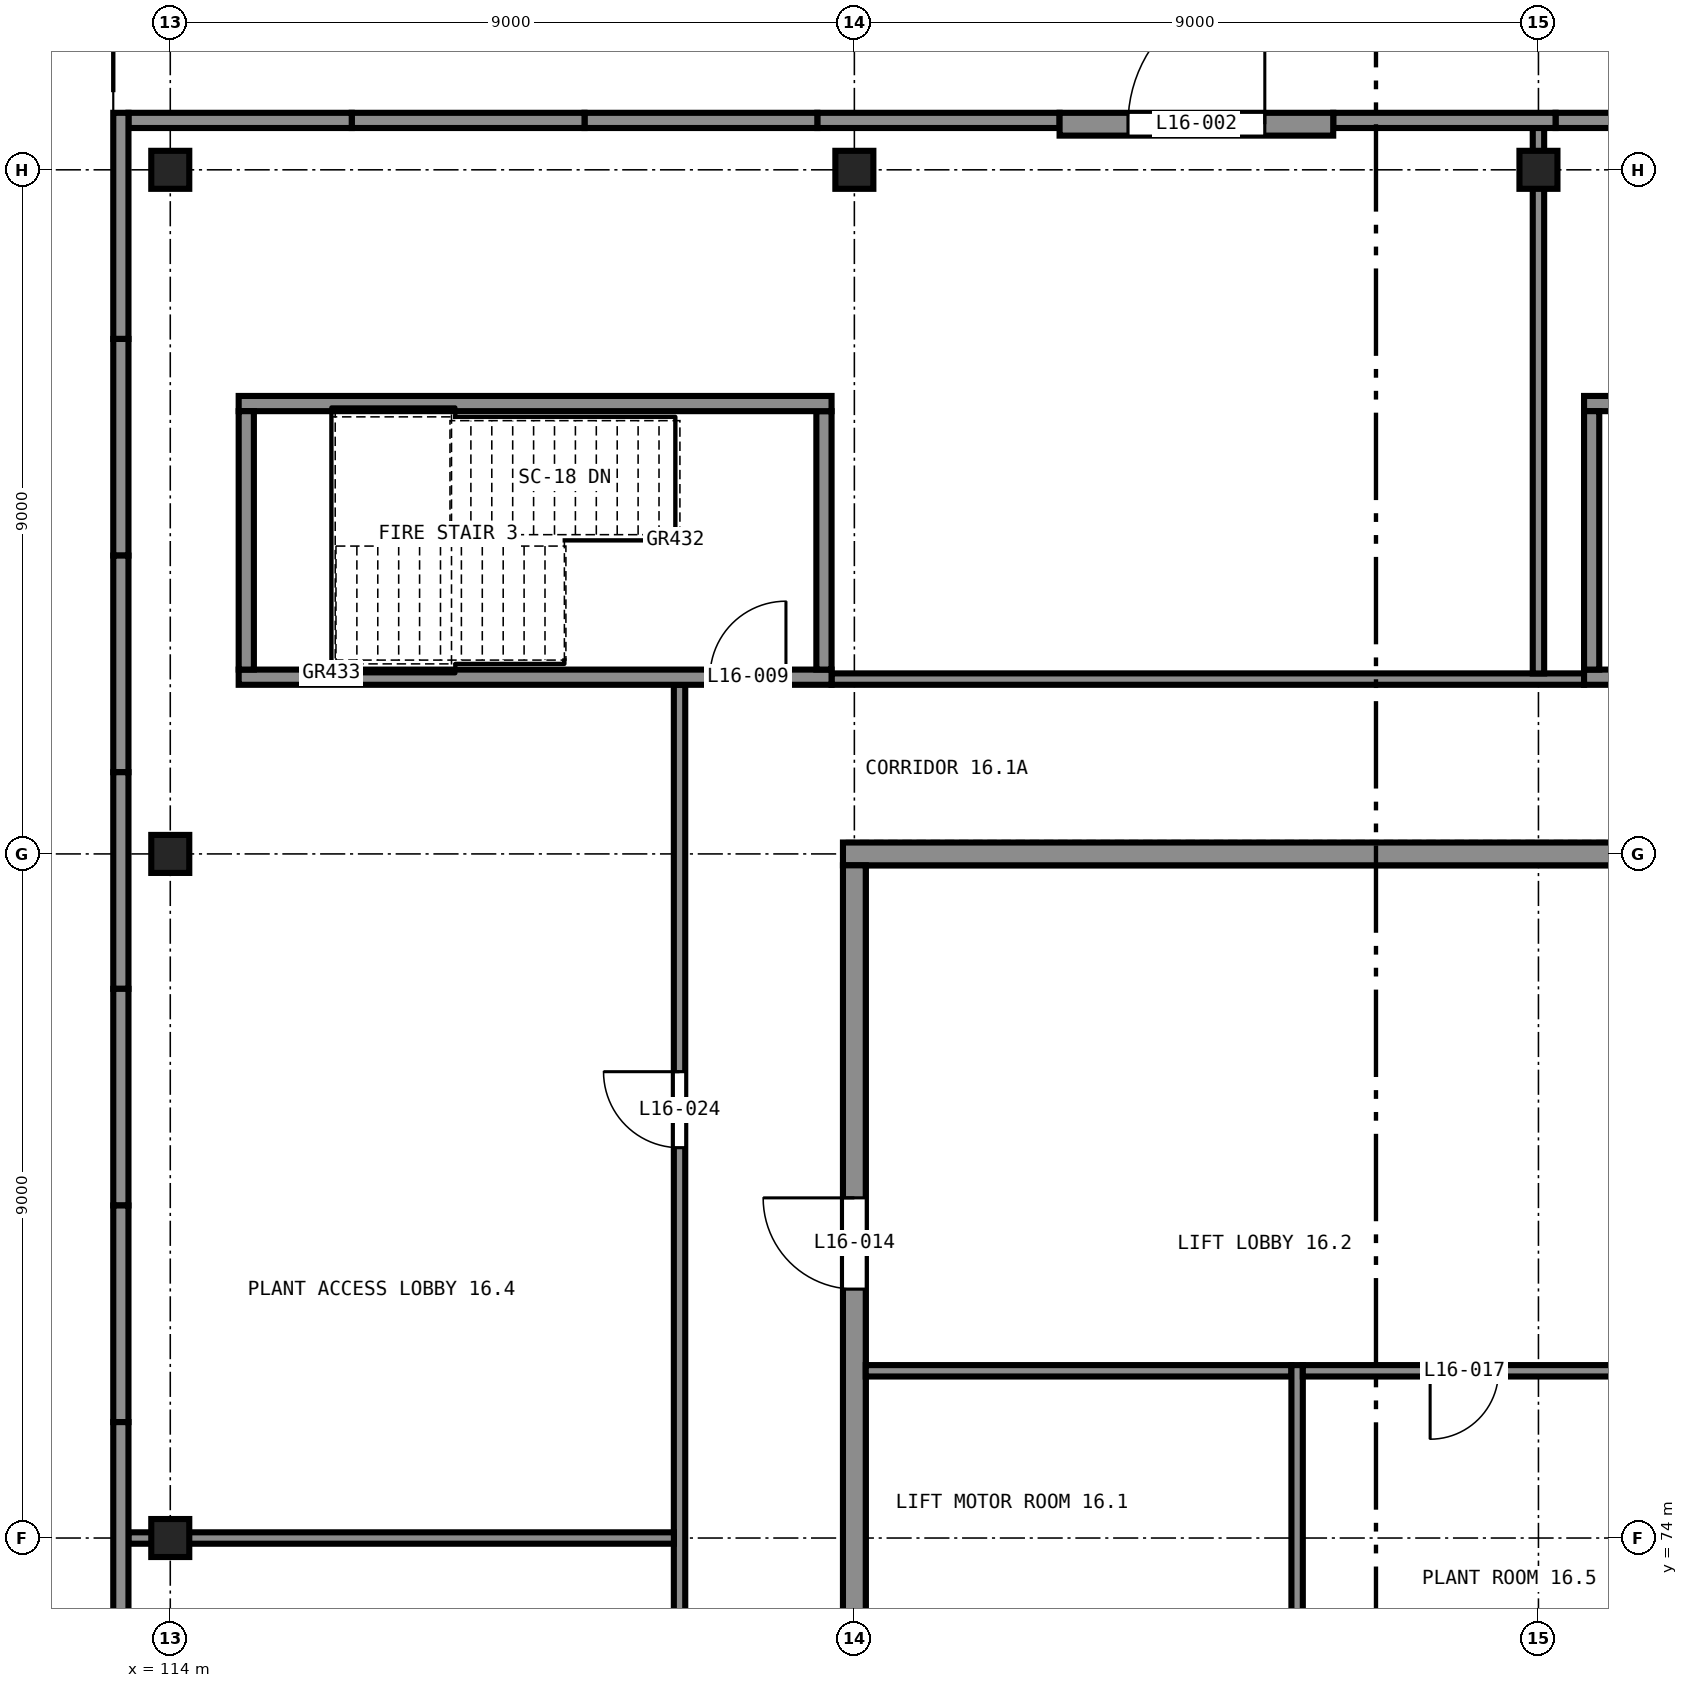
"""IFC4 building model, lengths in metres.
Left out: names, types, materials, properties, quantities, classifications, styles, units other than length and angle.
Written with IfcOpenShell. Run it as: python <this file> out.ifc"""

import sys

from ifc_helpers import new_model, si_unit, direction, frame, frame_2d, origin, origin_2d, place, context, subcontext, project, spatial, polyline, rectangle, outline, extrude, element, fill, save


model = new_model("IFC4")
c1 = context("Model", 3, precision=1e-05, world=origin(), true_north=direction((0.0, 1.0)))
c2 = subcontext(c1, "Body", "Model", "MODEL_VIEW")
j1 = project(units=[si_unit("LENGTHUNIT", "METRE"), si_unit("PLANEANGLEUNIT", "RADIAN")], contexts=[c1])
p1 = place(None, origin())
s1 = spatial("IfcSite", under=j1, at=p1, CompositionType="ELEMENT")
p2 = place(p1, origin())
s2 = spatial("IfcBuilding", under=s1, at=p2, CompositionType="ELEMENT")
p3 = place(p2, frame((0.0, 0.0, 65.5)))
s3 = spatial("IfcBuildingStorey", under=s2, at=p3, CompositionType="ELEMENT", Elevation=65.5)
for number, where, z_axis, x_axis in (
    (1, (114.0, 74.0, 0.0), (0.0, 0.0, 1.0), (1.0, 0.0, 0.0)),
    (2, (114.0, 83.0, 0.0), (0.0, 0.0, 1.0), (1.0, 0.0, 0.0)),
    (3, (114.0, 92.0, 0.0), (0.0, 0.0, 1.0), (1.0, 0.0, 0.0)),
    (4, (123.0, 92.0, 0.0), (0.0, 0.0, 1.0), (1.0, 0.0, 0.0)),
    (5, (132.0, 92.0, 0.0), (0.0, 0.0, 1.0), (1.0, 0.0, 0.0)),
):
    element("IfcColumn", number, at=place(p3, frame(where, z_axis=z_axis, x_axis=x_axis)), inside=s3, PredefinedType="COLUMN", context=c2, shape_type="SweptSolid", body=[
        extrude(rectangle(XDim=0.5, YDim=0.5, at=origin_2d()), origin(), (0.0, 0.0, 1.0), 4.7),
    ])
p4 = place(p3, frame((141.15, 83.0, 0.0), z_axis=(0.0, 0.0, 1.0), x_axis=(-1.0, 0.0, 0.0)))
e6 = element("IfcWall", 6, at=p4, inside=s3, PredefinedType="SHEAR", context=c2, shape_type="SweptSolid", body=[
    extrude(rectangle(XDim=18.3, YDim=0.3, at=frame_2d((9.15, 0.0))), origin(), (0.0, 0.0, 1.0), 4.7),
])
p5 = place(p3, frame((123.0, 82.85, 0.0), z_axis=(0.0, 0.0, 1.0), x_axis=(0.0, -1.0, 0.0)))
e7 = element("IfcWall", 7, at=p5, inside=s3, PredefinedType="SHEAR", context=c2, shape_type="SweptSolid", body=[
    extrude(rectangle(XDim=17.7, YDim=0.3, at=frame_2d((8.85, 0.0))), origin(), (0.0, 0.0, 1.0), 4.7),
])
p6 = place(p5, frame((12.125, 0.0, 0.0)))
e8 = element("IfcOpeningElement", 8, at=p6, cuts=e7, PredefinedType="OPENING", context=c2, shape_type="SweptSolid", body=[
    extrude(rectangle(XDim=1.2, YDim=2.1, at=frame_2d((0.6, 1.05))), frame((0.0, 0.16, 0.0), z_axis=(0.0, -1.0, 0.0), x_axis=(1.0, 0.0, 0.0)), (0.0, 0.0, 1.0), 0.32),
])
p7 = place(p5, frame((4.375, 0.0, 0.0)))
e9 = element("IfcOpeningElement", 9, at=p7, cuts=e7, PredefinedType="OPENING", context=c2, shape_type="SweptSolid", body=[
    extrude(rectangle(XDim=1.2, YDim=2.1, at=frame_2d((0.6, 1.05))), frame((0.0, 0.16, 0.0), z_axis=(0.0, -1.0, 0.0), x_axis=(1.0, 0.0, 0.0)), (0.0, 0.0, 1.0), 0.32),
])
p8 = place(p3, frame((135.275, 92.65, 0.0), z_axis=(0.0, 0.0, 1.0), x_axis=(-1.0, 0.0, 0.0)))
e10 = element("IfcWall", 10, at=p8, inside=s3, PredefinedType="SOLIDWALL", context=c2, shape_type="SweptSolid", body=[
    extrude(rectangle(XDim=3.05, YDim=0.2, at=frame_2d((1.525, 0.0))), origin(), (0.0, 0.0, 1.0), 4.7),
])
p9 = place(p3, frame((132.225, 92.65, 0.0), z_axis=(0.0, 0.0, 1.0), x_axis=(-1.0, 0.0, 0.0)))
e11 = element("IfcWall", 11, at=p9, inside=s3, PredefinedType="SOLIDWALL", context=c2, shape_type="SweptSolid", body=[
    extrude(rectangle(XDim=2.925, YDim=0.2, at=frame_2d((1.462, 0.0))), origin(), (0.0, 0.0, 1.0), 4.7),
])
p10 = place(p3, frame((129.3, 92.6, 0.0), z_axis=(0.0, 0.0, 1.0), x_axis=(-1.0, 0.0, 0.0)))
e12 = element("IfcWall", 12, at=p10, inside=s3, PredefinedType="SOLIDWALL", context=c2, shape_type="SweptSolid", body=[
    extrude(rectangle(XDim=3.6, YDim=0.3, at=frame_2d((1.8, 0.0))), origin(), (0.0, 0.0, 1.0), 4.7),
])
p11 = place(p10, frame((0.9, 0.0, 0.0)))
e13 = element("IfcOpeningElement", 13, at=p11, cuts=e12, PredefinedType="OPENING", context=c2, shape_type="SweptSolid", body=[
    extrude(rectangle(XDim=1.8, YDim=2.4, at=frame_2d((0.9, 1.2))), frame((0.0, 0.16, 0.0), z_axis=(0.0, -1.0, 0.0), x_axis=(1.0, 0.0, 0.0)), (0.0, 0.0, 1.0), 0.32),
])
p12 = place(p3, frame((125.7, 92.65, 0.0), z_axis=(0.0, 0.0, 1.0), x_axis=(-1.0, 0.0, 0.0)))
e14 = element("IfcWall", 14, at=p12, inside=s3, PredefinedType="SOLIDWALL", context=c2, shape_type="SweptSolid", body=[
    extrude(rectangle(XDim=3.188, YDim=0.2, at=frame_2d((1.594, 0.0))), origin(), (0.0, 0.0, 1.0), 4.7),
])
for number, where, z_axis, x_axis in (
    (15, (122.512, 92.65, 0.0), (0.0, 0.0, 1.0), (-1.0, 0.0, 0.0)),
    (16, (119.45, 92.65, 0.0), (0.0, 0.0, 1.0), (-1.0, 0.0, 0.0)),
):
    element("IfcWall", number, at=place(p3, frame(where, z_axis=z_axis, x_axis=x_axis)), inside=s3, PredefinedType="SOLIDWALL", context=c2, shape_type="SweptSolid", body=[
        extrude(rectangle(XDim=3.062, YDim=0.2, at=frame_2d((1.531, 0.0))), origin(), (0.0, 0.0, 1.0), 4.7),
    ])
p13 = place(p3, frame((116.387, 92.65, 0.0), z_axis=(0.0, 0.0, 1.0), x_axis=(-1.0, 0.0, 0.0)))
e17 = element("IfcWall", 17, at=p13, inside=s3, PredefinedType="SOLIDWALL", context=c2, shape_type="SweptSolid", body=[
    extrude(rectangle(XDim=2.938, YDim=0.2, at=frame_2d((1.469, 0.0))), origin(), (0.0, 0.0, 1.0), 4.7),
])
p14 = place(p3, frame((113.35, 92.75, 0.0), z_axis=(0.0, 0.0, 1.0), x_axis=(0.0, -1.0, 0.0)))
e18 = element("IfcWall", 18, at=p14, inside=s3, PredefinedType="SOLIDWALL", context=c2, shape_type="SweptSolid", body=[
    extrude(rectangle(XDim=2.975, YDim=0.2, at=frame_2d((1.488, 0.0))), origin(), (0.0, 0.0, 1.0), 4.7),
])
p15 = place(p3, frame((113.35, 89.775, 0.0), z_axis=(0.0, 0.0, 1.0), x_axis=(0.0, -1.0, 0.0)))
e19 = element("IfcWall", 19, at=p15, inside=s3, PredefinedType="SOLIDWALL", context=c2, shape_type="SweptSolid", body=[
    extrude(rectangle(XDim=2.85, YDim=0.2, at=frame_2d((1.425, 0.0))), origin(), (0.0, 0.0, 1.0), 4.7),
])
p16 = place(p3, frame((113.35, 86.925, 0.0), z_axis=(0.0, 0.0, 1.0), x_axis=(0.0, -1.0, 0.0)))
e20 = element("IfcWall", 20, at=p16, inside=s3, PredefinedType="SOLIDWALL", context=c2, shape_type="SweptSolid", body=[
    extrude(rectangle(XDim=2.85, YDim=0.2, at=frame_2d((1.425, 0.0))), origin(), (0.0, 0.0, 1.0), 4.7),
])
p17 = place(p3, frame((113.35, 84.075, 0.0), z_axis=(0.0, 0.0, 1.0), x_axis=(0.0, -1.0, 0.0)))
e21 = element("IfcWall", 21, at=p17, inside=s3, PredefinedType="SOLIDWALL", context=c2, shape_type="SweptSolid", body=[
    extrude(rectangle(XDim=2.85, YDim=0.2, at=frame_2d((1.425, 0.0))), origin(), (0.0, 0.0, 1.0), 4.7),
])
for number, where, z_axis, x_axis in (
    (22, (113.35, 81.225, 0.0), (0.0, 0.0, 1.0), (0.0, -1.0, 0.0)),
    (23, (113.35, 78.375, 0.0), (0.0, 0.0, 1.0), (0.0, -1.0, 0.0)),
):
    element("IfcWall", number, at=place(p3, frame(where, z_axis=z_axis, x_axis=x_axis)), inside=s3, PredefinedType="SOLIDWALL", context=c2, shape_type="SweptSolid", body=[
        extrude(rectangle(XDim=2.85, YDim=0.2, at=frame_2d((1.425, 0.0))), origin(), (0.0, 0.0, 1.0), 4.7),
    ])
p18 = place(p3, frame((113.35, 75.525, 0.0), z_axis=(0.0, 0.0, 1.0), x_axis=(0.0, -1.0, 0.0)))
e24 = element("IfcWall", 24, at=p18, inside=s3, PredefinedType="SOLIDWALL", context=c2, shape_type="SweptSolid", body=[
    extrude(rectangle(XDim=2.85, YDim=0.2, at=frame_2d((1.425, 0.0))), origin(), (0.0, 0.0, 1.0), 4.7),
])
p19 = place(p3, frame((132.6, 85.325, 0.0), z_axis=(0.0, 0.0, 1.0), x_axis=(1.0, 0.0, 0.0)))
e25 = element("IfcWall", 25, at=p19, inside=s3, PredefinedType="SHEAR", context=c2, shape_type="SweptSolid", body=[
    extrude(rectangle(XDim=7.8, YDim=0.2, at=frame_2d((3.9, 0.0))), origin(), (0.0, 0.0, 1.0), 4.7),
])
p20 = place(p19, frame((0.6, 0.0, 0.0)))
e26 = element("IfcOpeningElement", 26, at=p20, cuts=e25, PredefinedType="OPENING", context=c2, shape_type="SweptSolid", body=[
    extrude(rectangle(XDim=1.0, YDim=2.1, at=frame_2d((0.5, 1.05))), frame((0.0, 0.11, 0.0), z_axis=(0.0, -1.0, 0.0), x_axis=(1.0, 0.0, 0.0)), (0.0, 0.0, 1.0), 0.22),
])
p21 = place(p3, frame((140.4, 88.925, 0.0), z_axis=(0.0, 0.0, 1.0), x_axis=(-1.0, 0.0, 0.0)))
e27 = element("IfcWall", 27, at=p21, inside=s3, PredefinedType="SHEAR", context=c2, shape_type="SweptSolid", body=[
    extrude(rectangle(XDim=7.8, YDim=0.2, at=frame_2d((3.9, 0.0))), origin(), (0.0, 0.0, 1.0), 4.7),
])
p22 = place(p3, frame((132.7, 88.825, 0.0), z_axis=(0.0, 0.0, 1.0), x_axis=(0.0, -1.0, 0.0)))
e28 = element("IfcWall", 28, at=p22, inside=s3, PredefinedType="SHEAR", context=c2, shape_type="SweptSolid", body=[
    extrude(rectangle(XDim=3.4, YDim=0.2, at=frame_2d((1.7, 0.0))), origin(), (0.0, 0.0, 1.0), 4.7),
])
p23 = place(p3, frame((114.9, 85.325, 0.0), z_axis=(0.0, 0.0, 1.0), x_axis=(1.0, 0.0, 0.0)))
e29 = element("IfcWall", 29, at=p23, inside=s3, PredefinedType="SHEAR", context=c2, shape_type="SweptSolid", body=[
    extrude(rectangle(XDim=7.8, YDim=0.2, at=frame_2d((3.9, 0.0))), origin(), (0.0, 0.0, 1.0), 4.7),
])
p24 = place(p23, frame((6.2, 0.0, 0.0)))
e30 = element("IfcOpeningElement", 30, at=p24, cuts=e29, PredefinedType="OPENING", context=c2, shape_type="SweptSolid", body=[
    extrude(rectangle(XDim=1.0, YDim=2.1, at=frame_2d((0.5, 1.05))), frame((0.0, 0.11, 0.0), z_axis=(0.0, -1.0, 0.0), x_axis=(1.0, 0.0, 0.0)), (0.0, 0.0, 1.0), 0.22),
])
p25 = place(p3, frame((122.6, 85.425, 0.0), z_axis=(0.0, 0.0, 1.0), x_axis=(0.0, 1.0, 0.0)))
e31 = element("IfcWall", 31, at=p25, inside=s3, PredefinedType="SHEAR", context=c2, shape_type="SweptSolid", body=[
    extrude(rectangle(XDim=3.4, YDim=0.2, at=frame_2d((1.7, 0.0))), origin(), (0.0, 0.0, 1.0), 4.7),
])
p26 = place(p3, frame((122.7, 88.925, 0.0), z_axis=(0.0, 0.0, 1.0), x_axis=(-1.0, 0.0, 0.0)))
e32 = element("IfcWall", 32, at=p26, inside=s3, PredefinedType="SHEAR", context=c2, shape_type="SweptSolid", body=[
    extrude(rectangle(XDim=7.8, YDim=0.2, at=frame_2d((3.9, 0.0))), origin(), (0.0, 0.0, 1.0), 4.7),
])
p27 = place(p3, frame((115.0, 88.825, 0.0), z_axis=(0.0, 0.0, 1.0), x_axis=(0.0, -1.0, 0.0)))
e33 = element("IfcWall", 33, at=p27, inside=s3, PredefinedType="SHEAR", context=c2, shape_type="SweptSolid", body=[
    extrude(rectangle(XDim=3.4, YDim=0.2, at=frame_2d((1.7, 0.0))), origin(), (0.0, 0.0, 1.0), 4.7),
])
p28 = place(p3, frame((132.6, 85.325, 5.0), z_axis=(0.0, 0.0, 1.0), x_axis=(1.0, 0.0, 0.0)))
e34 = element("IfcWall", 34, at=p28, inside=s3, PredefinedType="SHEAR", context=c2, shape_type="SweptSolid", body=[
    extrude(outline(polyline([(0.0, 0.0), (7.8, 0.0), (7.8, 3.591), (0.0, 3.591), (0.0, 0.0)])), frame((0.0, 0.1, 0.0), z_axis=(0.0, -1.0, 0.0), x_axis=(1.0, 0.0, 0.0)), (0.0, 0.0, 1.0), 0.2),
])
p29 = place(p3, frame((140.4, 88.925, 5.0), z_axis=(0.0, 0.0, 1.0), x_axis=(-1.0, 0.0, 0.0)))
e35 = element("IfcWall", 35, at=p29, inside=s3, PredefinedType="SHEAR", context=c2, shape_type="SweptSolid", body=[
    extrude(outline(polyline([(0.0, 0.0), (7.8, 0.0), (7.8, 2.627), (0.0, 2.627), (0.0, 0.0)])), frame((0.0, 0.1, 0.0), z_axis=(0.0, -1.0, 0.0), x_axis=(1.0, 0.0, 0.0)), (0.0, 0.0, 1.0), 0.2),
])
p30 = place(p3, frame((132.7, 88.825, 5.0), z_axis=(0.0, 0.0, 1.0), x_axis=(0.0, -1.0, 0.0)))
e36 = element("IfcWall", 36, at=p30, inside=s3, PredefinedType="SHEAR", context=c2, shape_type="SweptSolid", body=[
    extrude(outline(polyline([(0.0, 0.0), (3.4, 0.0), (3.4, 3.565), (0.0, 2.654), (0.0, 0.0)])), frame((0.0, 0.1, 0.0), z_axis=(0.0, -1.0, 0.0), x_axis=(1.0, 0.0, 0.0)), (0.0, 0.0, 1.0), 0.2),
])
p31 = place(p30, frame((1.2, 0.0, 0.0)))
e37 = element("IfcOpeningElement", 37, at=p31, cuts=e36, PredefinedType="OPENING", context=c2, shape_type="SweptSolid", body=[
    extrude(rectangle(XDim=1.0, YDim=2.1, at=frame_2d((0.5, 1.05))), frame((0.0, 0.11, 0.0), z_axis=(0.0, -1.0, 0.0), x_axis=(1.0, 0.0, 0.0)), (0.0, 0.0, 1.0), 0.22),
])
p32 = place(p3, frame((128.825, 71.725, 0.0), z_axis=(0.0, 0.0, 1.0), x_axis=(0.0, 1.0, 0.0)))
e38 = element("IfcWall", 38, at=p32, inside=s3, PredefinedType="PARTITIONING", context=c2, shape_type="SweptSolid", body=[
    extrude(rectangle(XDim=4.55, YDim=0.15, at=frame_2d((2.275, 0.0))), origin(), (0.0, 0.0, 1.0), 4.7),
])
p33 = place(p3, frame((123.15, 76.2, 0.0), z_axis=(0.0, 0.0, 1.0), x_axis=(1.0, 0.0, 0.0)))
e39 = element("IfcWall", 39, at=p33, inside=s3, PredefinedType="PARTITIONING", context=c2, shape_type="SweptSolid", body=[
    extrude(rectangle(XDim=5.6, YDim=0.15, at=frame_2d((2.8, 0.0))), origin(), (0.0, 0.0, 1.0), 4.7),
])
p34 = place(p3, frame((128.9, 76.2, 0.0), z_axis=(0.0, 0.0, 1.0), x_axis=(1.0, 0.0, 0.0)))
e40 = element("IfcWall", 40, at=p34, inside=s3, PredefinedType="PARTITIONING", context=c2, shape_type="SweptSolid", body=[
    extrude(rectangle(XDim=4.25, YDim=0.15, at=frame_2d((2.125, 0.0))), origin(), (0.0, 0.0, 1.0), 4.7),
])
p35 = place(p34, frame((1.675, 0.0, 0.0)))
e41 = element("IfcOpeningElement", 41, at=p35, cuts=e40, PredefinedType="OPENING", context=c2, shape_type="SweptSolid", body=[
    extrude(rectangle(XDim=0.9, YDim=2.1, at=frame_2d((0.45, 1.05))), frame((0.0, 0.085, 0.0), z_axis=(0.0, -1.0, 0.0), x_axis=(1.0, 0.0, 0.0)), (0.0, 0.0, 1.0), 0.17),
])
p36 = place(p3, frame((120.7, 64.45, 0.0), z_axis=(0.0, 0.0, 1.0), x_axis=(0.0, 1.0, 0.0)))
e42 = element("IfcWall", 42, at=p36, inside=s3, PredefinedType="PARTITIONING", context=c2, shape_type="SweptSolid", body=[
    extrude(rectangle(XDim=20.775, YDim=0.15, at=frame_2d((10.388, 0.0))), origin(), (0.0, 0.0, 1.0), 4.7),
])
p37 = place(p36, frame((4.363, 0.0, 0.0)))
e43 = element("IfcOpeningElement", 43, at=p37, cuts=e42, PredefinedType="OPENING", context=c2, shape_type="SweptSolid", body=[
    extrude(rectangle(XDim=1.0, YDim=2.1, at=frame_2d((0.5, 1.05))), frame((0.0, 0.085, 0.0), z_axis=(0.0, -1.0, 0.0), x_axis=(1.0, 0.0, 0.0)), (0.0, 0.0, 1.0), 0.17),
])
p38 = place(p36, frame((14.685, 0.0, 0.0)))
e44 = element("IfcOpeningElement", 44, at=p38, cuts=e42, PredefinedType="OPENING", context=c2, shape_type="SweptSolid", body=[
    extrude(rectangle(XDim=1.0, YDim=2.1, at=frame_2d((0.5, 1.05))), frame((0.0, 0.085, 0.0), z_axis=(0.0, -1.0, 0.0), x_axis=(1.0, 0.0, 0.0)), (0.0, 0.0, 1.0), 0.17),
])
p39 = place(p3, frame((122.7, 85.3, 0.0), z_axis=(0.0, 0.0, 1.0), x_axis=(1.0, 0.0, 0.0)))
e45 = element("IfcWall", 45, at=p39, inside=s3, PredefinedType="PARTITIONING", context=c2, shape_type="SweptSolid", body=[
    extrude(rectangle(XDim=9.9, YDim=0.15, at=frame_2d((4.95, 0.0))), origin(), (0.0, 0.0, 1.0), 4.7),
])
for number, where, z_axis, x_axis in (
    (46, (132.0, 85.374, 0.0), (0.0, 0.0, 1.0), (0.0, 1.0, 0.0)),
    (47, (113.449, 74.0, 0.0), (0.0, 0.0, 1.0), (1.0, 0.0, 0.0)),
):
    element("IfcWall", number, at=place(p3, frame(where, z_axis=z_axis, x_axis=x_axis)), inside=s3, PredefinedType="PARTITIONING", context=c2, shape_type="SweptSolid", body=[
        extrude(rectangle(XDim=7.177, YDim=0.15, at=frame_2d((3.588, 0.0))), origin(), (0.0, 0.0, 1.0), 3.8),
    ])
p40 = place(p11, frame((1.8, 0.0, 0.0), z_axis=(0.0, 0.0, 1.0), x_axis=(-1.0, 0.0, 0.0)))
e48 = element("IfcDoor", 48, at=p40, inside=s3, OperationType="DOUBLE_DOOR_SINGLE_SWING", PredefinedType="DOOR", context=c2, shape_type="SweptSolid", body=[
    extrude(rectangle(XDim=1.8, YDim=2.4, at=frame_2d((0.9, 1.2))), frame((0.0, 0.025, 0.0), z_axis=(0.0, -1.0, 0.0), x_axis=(1.0, 0.0, 0.0)), (0.0, 0.0, 1.0), 0.05),
])
fill(e13, e48)
p41 = place(p24, origin())
e49 = element("IfcDoor", 49, at=p41, inside=s3, OperationType="SINGLE_SWING_LEFT", PredefinedType="DOOR", context=c2, shape_type="SweptSolid", body=[
    extrude(rectangle(XDim=1.0, YDim=2.1, at=frame_2d((0.5, 1.05))), frame((0.0, 0.025, 0.0), z_axis=(0.0, -1.0, 0.0), x_axis=(1.0, 0.0, 0.0)), (0.0, 0.0, 1.0), 0.05),
])
fill(e30, e49)
p42 = place(p31, frame((1.0, 0.0, 0.0), z_axis=(0.0, 0.0, 1.0), x_axis=(-1.0, 0.0, 0.0)))
e50 = element("IfcDoor", 50, at=p42, inside=s3, OperationType="SINGLE_SWING_LEFT", PredefinedType="DOOR", context=c2, shape_type="SweptSolid", body=[
    extrude(rectangle(XDim=1.0, YDim=2.1, at=frame_2d((0.5, 1.05))), frame((0.0, 0.025, 0.0), z_axis=(0.0, -1.0, 0.0), x_axis=(1.0, 0.0, 0.0)), (0.0, 0.0, 1.0), 0.05),
])
fill(e37, e50)
p43 = place(p7, frame((1.2, 0.0, 0.0), z_axis=(0.0, 0.0, 1.0), x_axis=(-1.0, 0.0, 0.0)))
e51 = element("IfcDoor", 51, at=p43, inside=s3, OperationType="SINGLE_SWING_LEFT", PredefinedType="DOOR", context=c2, shape_type="SweptSolid", body=[
    extrude(rectangle(XDim=1.2, YDim=2.1, at=frame_2d((0.6, 1.05))), frame((0.0, 0.025, 0.0), z_axis=(0.0, -1.0, 0.0), x_axis=(1.0, 0.0, 0.0)), (0.0, 0.0, 1.0), 0.05),
])
fill(e9, e51)
p44 = place(p35, frame((0.9, 0.0, 0.0), z_axis=(0.0, 0.0, 1.0), x_axis=(-1.0, 0.0, 0.0)))
e52 = element("IfcDoor", 52, at=p44, inside=s3, OperationType="SINGLE_SWING_LEFT", PredefinedType="DOOR", context=c2, shape_type="SweptSolid", body=[
    extrude(rectangle(XDim=0.9, YDim=2.1, at=frame_2d((0.45, 1.05))), frame((0.0, 0.025, 0.0), z_axis=(0.0, -1.0, 0.0), x_axis=(1.0, 0.0, 0.0)), (0.0, 0.0, 1.0), 0.05),
])
fill(e41, e52)
p45 = place(p38, origin())
e53 = element("IfcDoor", 53, at=p45, inside=s3, OperationType="SINGLE_SWING_LEFT", PredefinedType="DOOR", context=c2, shape_type="SweptSolid", body=[
    extrude(rectangle(XDim=1.0, YDim=2.1, at=frame_2d((0.5, 1.05))), frame((0.0, 0.025, 0.0), z_axis=(0.0, -1.0, 0.0), x_axis=(1.0, 0.0, 0.0)), (0.0, 0.0, 1.0), 0.05),
])
fill(e44, e53)
save(model, sys.argv[1])
